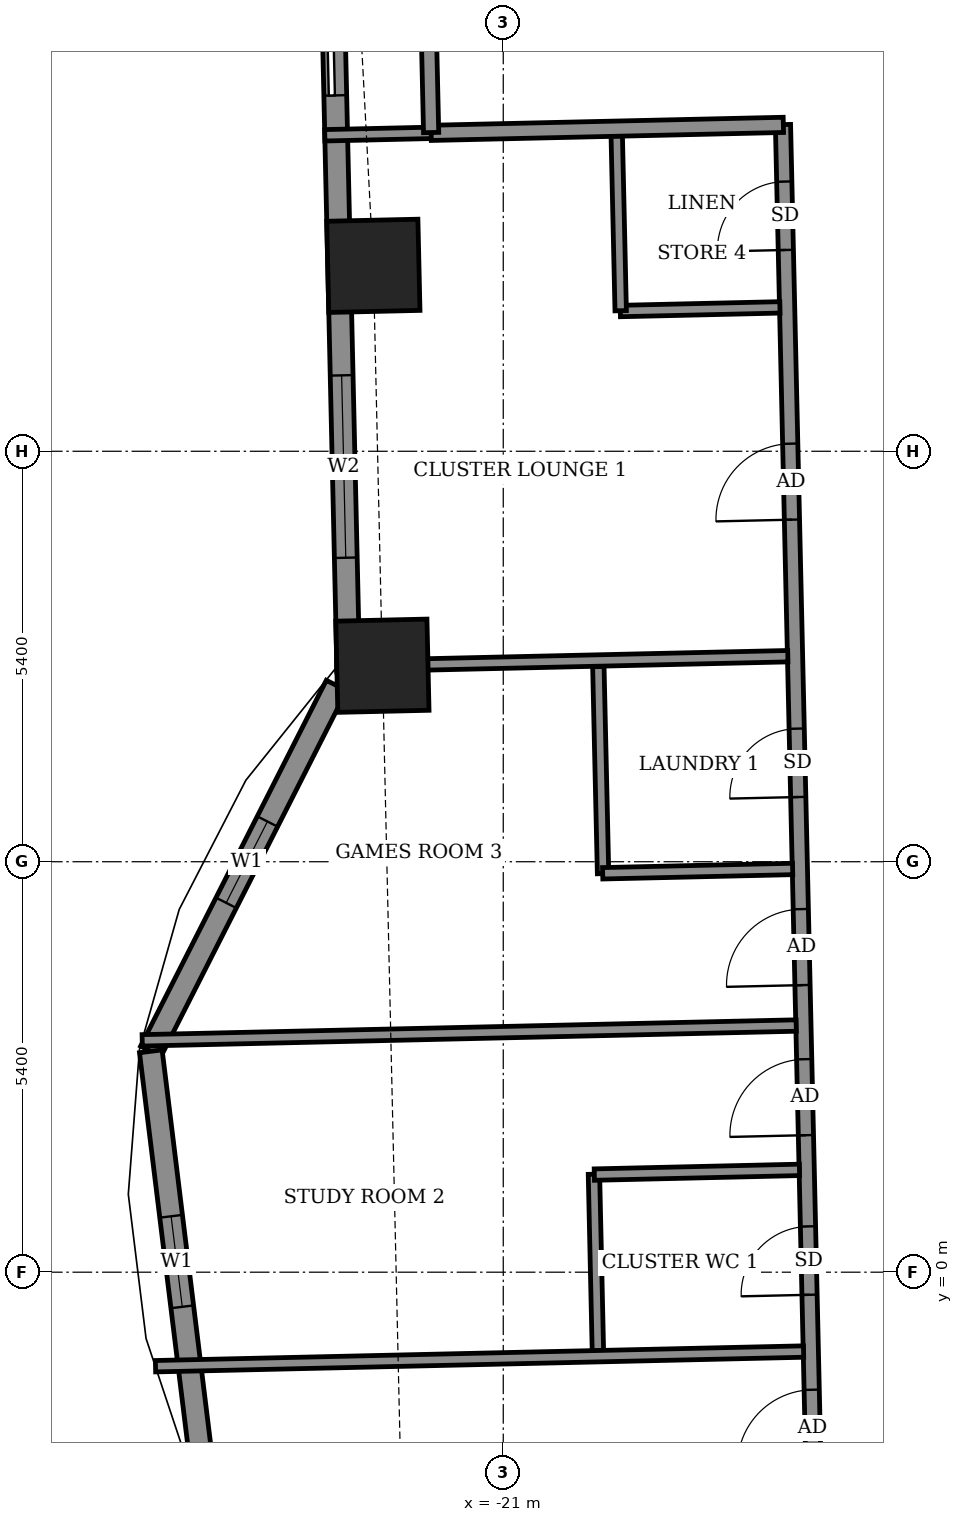
"""IFC4 building model, lengths in metres.
Left out: names, types, materials, properties, quantities, classifications, styles, units other than length and angle.
Written with IfcOpenShell. Run it as: python <this file> out.ifc"""

import sys

from ifc_helpers import new_model, si_unit, direction, frame, frame_2d, origin, origin_2d, place, context, subcontext, project, spatial, rectangle, extrude, element, fill, save


model = new_model("IFC4")
c1 = context("Model", 3, precision=1e-05, world=origin(), true_north=direction((0.0, 1.0)))
c2 = subcontext(c1, "Body", "Model", "MODEL_VIEW")
j1 = project(units=[si_unit("LENGTHUNIT", "METRE"), si_unit("PLANEANGLEUNIT", "RADIAN")], contexts=[c1])
p1 = place(None, origin())
s1 = spatial("IfcSite", under=j1, at=p1, CompositionType="ELEMENT")
p2 = place(p1, origin())
s2 = spatial("IfcBuilding", under=s1, at=p2, CompositionType="ELEMENT")
p3 = place(p2, frame((0.0, 0.0, 189.7)))
s3 = spatial("IfcBuildingStorey", under=s2, at=p3, CompositionType="ELEMENT", Elevation=189.7)
for number, where, z_axis, x_axis in (
    (1, (-22.709, 13.24, -0.55), (0.0, 0.0, 1.0), (0.023, -1.0, 0.0)),
    (2, (-22.59, 7.979, -0.55), (0.0, 0.0, 1.0), (0.023, -1.0, 0.0)),
):
    element("IfcColumn", number, at=place(p3, frame(where, z_axis=z_axis, x_axis=x_axis)), inside=s3, PredefinedType="COLUMN", context=c2, shape_type="SweptSolid", body=[
        extrude(rectangle(XDim=1.2, YDim=1.2, at=origin_2d()), origin(), (0.0, 0.0, 1.0), 3.6),
    ])
p4 = place(p3, frame((-23.275, 18.34, 0.0), z_axis=(0.0, 0.0, 1.0), x_axis=(0.022705985163, -0.999742185885, 0.0)))
e3 = element("IfcWall", 3, at=p4, inside=s3, PredefinedType="SOLIDWALL", context=c2, shape_type="SweptSolid", body=[
    extrude(rectangle(XDim=10.43, YDim=0.3, at=frame_2d((5.215, 0.0))), origin(), (0.0, 0.0, 1.0), 3.05),
])
p5 = place(p4, frame((1.359, 0.0, 0.0)))
e4 = element("IfcOpeningElement", 4, at=p5, cuts=e3, PredefinedType="OPENING", context=c2, shape_type="SweptSolid", body=[
    extrude(rectangle(XDim=1.5, YDim=2.4, at=frame_2d((0.75, 1.2))), frame((0.0, 0.16, 0.0), z_axis=(0.0, -1.0, 0.0), x_axis=(1.0, 0.0, 0.0)), (0.0, 0.0, 1.0), 0.32),
])
p6 = place(p4, frame((6.543, 0.0, 0.9)))
e5 = element("IfcOpeningElement", 5, at=p6, cuts=e3, PredefinedType="OPENING", context=c2, shape_type="SweptSolid", body=[
    extrude(rectangle(XDim=2.4, YDim=1.5, at=frame_2d((1.2, 0.75))), frame((0.0, 0.16, 0.0), z_axis=(0.0, -1.0, 0.0), x_axis=(1.0, 0.0, 0.0)), (0.0, 0.0, 1.0), 0.32),
])
p7 = place(p3, frame((-23.194, 7.719, 0.0), z_axis=(0.0, 0.0, 1.0), x_axis=(-0.452597193435, -0.891715078091, 0.0)))
e6 = element("IfcWall", 6, at=p7, inside=s3, PredefinedType="SOLIDWALL", context=c2, shape_type="SweptSolid", body=[
    extrude(rectangle(XDim=5.397, YDim=0.3, at=frame_2d((2.699, 0.0))), origin(), (0.0, 0.0, 1.0), 3.05),
])
p8 = place(p7, frame((2.007, 0.0, 0.9)))
e7 = element("IfcOpeningElement", 7, at=p8, cuts=e6, PredefinedType="OPENING", context=c2, shape_type="SweptSolid", body=[
    extrude(rectangle(XDim=1.2, YDim=1.5, at=frame_2d((0.6, 0.75))), frame((0.0, 0.16, 0.0), z_axis=(0.0, -1.0, 0.0), x_axis=(1.0, 0.0, 0.0)), (0.0, 0.0, 1.0), 0.32),
])
p9 = place(p3, frame((-25.637, 2.906, 0.0), z_axis=(0.0, 0.0, 1.0), x_axis=(0.122163831021, -0.992509948761, 0.0)))
e8 = element("IfcWall", 8, at=p9, inside=s3, PredefinedType="SOLIDWALL", context=c2, shape_type="SweptSolid", body=[
    extrude(rectangle(XDim=5.574, YDim=0.3, at=frame_2d((2.787, 0.0))), origin(), (0.0, 0.0, 1.0), 3.05),
])
p10 = place(p9, frame((2.187, 0.0, 0.9)))
e9 = element("IfcOpeningElement", 9, at=p10, cuts=e8, PredefinedType="OPENING", context=c2, shape_type="SweptSolid", body=[
    extrude(rectangle(XDim=1.2, YDim=1.5, at=frame_2d((0.6, 0.75))), frame((0.0, 0.16, 0.0), z_axis=(0.0, -1.0, 0.0), x_axis=(1.0, 0.0, 0.0)), (0.0, 0.0, 1.0), 0.32),
])
p11 = place(p3, frame((-25.988, 16.028, 0.0), z_axis=(0.0, 0.0, 1.0), x_axis=(-0.022892431828, 0.999737933943, 0.0)))
e10 = element("IfcWall", 10, at=p11, inside=s3, PredefinedType="USERDEFINED", context=c2, shape_type="SweptSolid", body=[
    extrude(rectangle(XDim=2.4, YDim=0.55, at=frame_2d((1.2, 0.0))), origin(), (0.0, 0.0, 1.0), 0.8),
])
p12 = place(p3, frame((-16.684, -12.919, 0.0), z_axis=(0.0, 0.0, 1.0), x_axis=(-0.022694293906, 0.999742451346, 0.0)))
e11 = element("IfcWall", 11, at=p12, inside=s3, PredefinedType="PARTITIONING", context=c2, shape_type="SweptSolid", body=[
    extrude(rectangle(XDim=28.024, YDim=0.2, at=frame_2d((14.012, 0.0))), origin(), (0.0, 0.0, 1.0), 3.05),
])
p13 = place(p12, frame((22.825, 0.0, 0.0)))
e12 = element("IfcOpeningElement", 12, at=p13, cuts=e11, PredefinedType="OPENING", context=c2, shape_type="SweptSolid", body=[
    extrude(rectangle(XDim=1.0, YDim=2.1, at=frame_2d((0.5, 1.05))), frame((0.0, 0.11, 0.0), z_axis=(0.0, -1.0, 0.0), x_axis=(1.0, 0.0, 0.0)), (0.0, 0.0, 1.0), 0.22),
])
p14 = place(p12, frame((26.374, 0.0, 0.0)))
e13 = element("IfcOpeningElement", 13, at=p14, cuts=e11, PredefinedType="OPENING", context=c2, shape_type="SweptSolid", body=[
    extrude(rectangle(XDim=0.9, YDim=2.1, at=frame_2d((0.45, 1.05))), frame((0.0, 0.11, 0.0), z_axis=(0.0, -1.0, 0.0), x_axis=(1.0, 0.0, 0.0)), (0.0, 0.0, 1.0), 0.22),
])
p15 = place(p12, frame((16.7, 0.0, 0.0)))
e14 = element("IfcOpeningElement", 14, at=p15, cuts=e11, PredefinedType="OPENING", context=c2, shape_type="SweptSolid", body=[
    extrude(rectangle(XDim=1.0, YDim=2.1, at=frame_2d((0.5, 1.05))), frame((0.0, 0.11, 0.0), z_axis=(0.0, -1.0, 0.0), x_axis=(1.0, 0.0, 0.0)), (0.0, 0.0, 1.0), 0.22),
])
p16 = place(p12, frame((19.175, 0.0, 0.0)))
e15 = element("IfcOpeningElement", 15, at=p16, cuts=e11, PredefinedType="OPENING", context=c2, shape_type="SweptSolid", body=[
    extrude(rectangle(XDim=0.9, YDim=2.1, at=frame_2d((0.45, 1.05))), frame((0.0, 0.11, 0.0), z_axis=(0.0, -1.0, 0.0), x_axis=(1.0, 0.0, 0.0)), (0.0, 0.0, 1.0), 0.22),
])
p17 = place(p12, frame((14.725, 0.0, 0.0)))
e16 = element("IfcOpeningElement", 16, at=p17, cuts=e11, PredefinedType="OPENING", context=c2, shape_type="SweptSolid", body=[
    extrude(rectangle(XDim=1.0, YDim=2.1, at=frame_2d((0.5, 1.05))), frame((0.0, 0.11, 0.0), z_axis=(0.0, -1.0, 0.0), x_axis=(1.0, 0.0, 0.0)), (0.0, 0.0, 1.0), 0.22),
])
p18 = place(p12, frame((12.625, 0.0, 0.0)))
e17 = element("IfcOpeningElement", 17, at=p18, cuts=e11, PredefinedType="OPENING", context=c2, shape_type="SweptSolid", body=[
    extrude(rectangle(XDim=0.9, YDim=2.1, at=frame_2d((0.45, 1.05))), frame((0.0, 0.11, 0.0), z_axis=(0.0, -1.0, 0.0), x_axis=(1.0, 0.0, 0.0)), (0.0, 0.0, 1.0), 0.22),
])
p19 = place(p12, frame((10.375, 0.0, 0.0)))
e18 = element("IfcOpeningElement", 18, at=p19, cuts=e11, PredefinedType="OPENING", context=c2, shape_type="SweptSolid", body=[
    extrude(rectangle(XDim=1.0, YDim=2.1, at=frame_2d((0.5, 1.05))), frame((0.0, 0.11, 0.0), z_axis=(0.0, -1.0, 0.0), x_axis=(1.0, 0.0, 0.0)), (0.0, 0.0, 1.0), 0.22),
])
p20 = place(p12, frame((8.125, 0.0, 0.0)))
e19 = element("IfcOpeningElement", 19, at=p20, cuts=e11, PredefinedType="OPENING", context=c2, shape_type="SweptSolid", body=[
    extrude(rectangle(XDim=0.9, YDim=2.1, at=frame_2d((0.45, 1.05))), frame((0.0, 0.11, 0.0), z_axis=(0.0, -1.0, 0.0), x_axis=(1.0, 0.0, 0.0)), (0.0, 0.0, 1.0), 0.22),
])
p21 = place(p12, frame((3.462, 0.0, 0.0)))
e20 = element("IfcOpeningElement", 20, at=p21, cuts=e11, PredefinedType="OPENING", context=c2, shape_type="SweptSolid", body=[
    extrude(rectangle(XDim=1.0, YDim=2.1, at=frame_2d((0.5, 1.05))), frame((0.0, 0.11, 0.0), z_axis=(0.0, -1.0, 0.0), x_axis=(1.0, 0.0, 0.0)), (0.0, 0.0, 1.0), 0.22),
])
p22 = place(p12, frame((5.625, 0.0, 0.0)))
e21 = element("IfcOpeningElement", 21, at=p22, cuts=e11, PredefinedType="OPENING", context=c2, shape_type="SweptSolid", body=[
    extrude(rectangle(XDim=0.9, YDim=2.1, at=frame_2d((0.45, 1.05))), frame((0.0, 0.11, 0.0), z_axis=(0.0, -1.0, 0.0), x_axis=(1.0, 0.0, 0.0)), (0.0, 0.0, 1.0), 0.22),
])
p23 = place(p3, frame((-19.755, -1.035, 0.0), z_axis=(0.0, 0.0, 1.0), x_axis=(-0.022370700241, 0.999749744571, 0.0)))
e22 = element("IfcWall", 22, at=p23, inside=s3, PredefinedType="PARTITIONING", context=c2, shape_type="SweptSolid", body=[
    extrude(rectangle(XDim=2.324, YDim=0.15, at=frame_2d((1.162, 0.0))), origin(), (0.0, 0.0, 1.0), 3.05),
])
p24 = place(p3, frame((-25.575, -1.237, 0.0), z_axis=(0.0, 0.0, 1.0), x_axis=(0.999743576582, 0.022644670096, 0.0)))
e23 = element("IfcWall", 23, at=p24, inside=s3, PredefinedType="PARTITIONING", context=c2, shape_type="SweptSolid", body=[
    extrude(rectangle(XDim=8.528, YDim=0.15, at=frame_2d((4.264, 0.0))), origin(), (0.0, 0.0, 1.0), 2.05),
])
p25 = place(p3, frame((-19.802, 1.284, 0.0), z_axis=(0.0, 0.0, 1.0), x_axis=(0.999736155505, 0.022969966847, 0.0)))
e24 = element("IfcWall", 24, at=p25, inside=s3, PredefinedType="PARTITIONING", context=c2, shape_type="SweptSolid", body=[
    extrude(rectangle(XDim=2.7, YDim=0.15, at=frame_2d((1.35, 0.0))), origin(), (0.0, 0.0, 1.0), 3.05),
])
p26 = place(p3, frame((-25.75, 3.05, 0.0), z_axis=(0.0, 0.0, 1.0), x_axis=(0.999743093505, 0.022665987507, 0.0)))
e25 = element("IfcWall", 25, at=p26, inside=s3, PredefinedType="PARTITIONING", context=c2, shape_type="SweptSolid", body=[
    extrude(rectangle(XDim=8.606, YDim=0.15, at=frame_2d((4.303, 0.0))), origin(), (0.0, 0.0, 1.0), 2.05),
])
p27 = place(p3, frame((-19.687, 5.243, 0.0), z_axis=(0.0, 0.0, 1.0), x_axis=(-0.022758040381, 0.999741002259, 0.0)))
e26 = element("IfcWall", 26, at=p27, inside=s3, PredefinedType="PARTITIONING", context=c2, shape_type="SweptSolid", body=[
    extrude(rectangle(XDim=2.725, YDim=0.15, at=frame_2d((1.362, 0.0))), origin(), (0.0, 0.0, 1.0), 3.05),
])
p28 = place(p3, frame((-19.692, 5.248, 0.0), z_axis=(0.0, 0.0, 1.0), x_axis=(0.999740977561, 0.022759125332, 0.0)))
e27 = element("IfcWall", 27, at=p28, inside=s3, PredefinedType="PARTITIONING", context=c2, shape_type="SweptSolid", body=[
    extrude(rectangle(XDim=2.5, YDim=0.15, at=frame_2d((1.25, 0.0))), origin(), (0.0, 0.0, 1.0), 3.05),
])
p29 = place(p3, frame((-23.19, 7.969, 0.0), z_axis=(0.0, 0.0, 1.0), x_axis=(0.999741261868, 0.022746633113, 0.0)))
e28 = element("IfcWall", 28, at=p29, inside=s3, PredefinedType="PARTITIONING", context=c2, shape_type="SweptSolid", body=[
    extrude(rectangle(XDim=5.935, YDim=0.15, at=frame_2d((2.968, 0.0))), origin(), (0.0, 0.0, 1.0), 3.05),
])
p30 = place(p3, frame((-19.46, 12.645, 0.0), z_axis=(0.0, 0.0, 1.0), x_axis=(0.999737799372, 0.022898307927, 0.0)))
e29 = element("IfcWall", 29, at=p30, inside=s3, PredefinedType="PARTITIONING", context=c2, shape_type="SweptSolid", body=[
    extrude(rectangle(XDim=2.1, YDim=0.15, at=frame_2d((1.05, 0.0))), origin(), (0.0, 0.0, 1.0), 3.05),
])
p31 = place(p3, frame((-19.455, 12.649, 0.0), z_axis=(0.0, 0.0, 1.0), x_axis=(-0.022603288534, 0.999744513037, 0.0)))
e30 = element("IfcWall", 30, at=p31, inside=s3, PredefinedType="PARTITIONING", context=c2, shape_type="SweptSolid", body=[
    extrude(rectangle(XDim=2.301, YDim=0.15, at=frame_2d((1.15, 0.0))), origin(), (0.0, 0.0, 1.0), 3.05),
])
p32 = place(p3, frame((-23.348, 14.957, 0.0), z_axis=(0.0, 0.0, 1.0), x_axis=(0.999740216184, 0.022792545827, 0.0)))
e31 = element("IfcWall", 31, at=p32, inside=s3, PredefinedType="PARTITIONING", context=c2, shape_type="SweptSolid", body=[
    extrude(rectangle(XDim=1.403, YDim=0.15, at=frame_2d((0.702, 0.0))), origin(), (0.0, 0.0, 1.0), 2.55),
])
p33 = place(p3, frame((-21.949, 14.989, 0.0), z_axis=(0.0, 0.0, 1.0), x_axis=(0.999743491588, 0.022648422179, 0.0)))
e32 = element("IfcWall", 32, at=p33, inside=s3, PredefinedType="PARTITIONING", context=c2, shape_type="SweptSolid", body=[
    extrude(rectangle(XDim=4.635, YDim=0.2, at=frame_2d((2.318, 0.0))), origin(), (0.0, 0.0, 1.0), 3.05),
])
p34 = place(p3, frame((-21.949, 14.993, 0.0), z_axis=(0.0, 0.0, 1.0), x_axis=(-0.022617910375, 0.999744182344, 0.0)))
e33 = element("IfcWall", 33, at=p34, inside=s3, PredefinedType="PARTITIONING", context=c2, shape_type="SweptSolid", body=[
    extrude(rectangle(XDim=1.5, YDim=0.2, at=frame_2d((0.75, 0.0))), origin(), (0.0, 0.0, 1.0), 3.05),
])
p35 = place(p5, origin())
e34 = element("IfcDoor", 34, at=p35, inside=s3, OperationType="SLIDING_TO_LEFT", PredefinedType="DOOR", context=c2, shape_type="SweptSolid", body=[
    extrude(rectangle(XDim=1.5, YDim=2.4, at=frame_2d((0.75, 1.2))), frame((0.0, 0.025, 0.0), z_axis=(0.0, -1.0, 0.0), x_axis=(1.0, 0.0, 0.0)), (0.0, 0.0, 1.0), 0.05),
])
fill(e4, e34)
p36 = place(p6, origin())
e35 = element("IfcWindow", 35, at=p36, inside=s3, PartitioningType="DOUBLE_PANEL_VERTICAL", PredefinedType="WINDOW", context=c2, shape_type="SweptSolid", body=[
    extrude(rectangle(XDim=2.4, YDim=1.5, at=frame_2d((1.2, 0.75))), frame((0.0, 0.03, 0.0), z_axis=(0.0, -1.0, 0.0), x_axis=(1.0, 0.0, 0.0)), (0.0, 0.0, 1.0), 0.06),
])
fill(e5, e35)
p37 = place(p8, origin())
e36 = element("IfcWindow", 36, at=p37, inside=s3, PartitioningType="SINGLE_PANEL", PredefinedType="WINDOW", context=c2, shape_type="SweptSolid", body=[
    extrude(rectangle(XDim=1.2, YDim=1.5, at=frame_2d((0.6, 0.75))), frame((0.0, 0.03, 0.0), z_axis=(0.0, -1.0, 0.0), x_axis=(1.0, 0.0, 0.0)), (0.0, 0.0, 1.0), 0.06),
])
fill(e7, e36)
p38 = place(p10, origin())
e37 = element("IfcWindow", 37, at=p38, inside=s3, PartitioningType="SINGLE_PANEL", PredefinedType="WINDOW", context=c2, shape_type="SweptSolid", body=[
    extrude(rectangle(XDim=1.2, YDim=1.5, at=frame_2d((0.6, 0.75))), frame((0.0, 0.03, 0.0), z_axis=(0.0, -1.0, 0.0), x_axis=(1.0, 0.0, 0.0)), (0.0, 0.0, 1.0), 0.06),
])
fill(e9, e37)
p39 = place(p13, origin())
e38 = element("IfcDoor", 38, at=p39, inside=s3, OperationType="SINGLE_SWING_RIGHT", PredefinedType="DOOR", context=c2, shape_type="SweptSolid", body=[
    extrude(rectangle(XDim=1.0, YDim=2.1, at=frame_2d((0.5, 1.05))), frame((0.0, 0.025, 0.0), z_axis=(0.0, -1.0, 0.0), x_axis=(1.0, 0.0, 0.0)), (0.0, 0.0, 1.0), 0.05),
])
fill(e12, e38)
p40 = place(p14, origin())
e39 = element("IfcDoor", 39, at=p40, inside=s3, OperationType="SINGLE_SWING_RIGHT", PredefinedType="DOOR", context=c2, shape_type="SweptSolid", body=[
    extrude(rectangle(XDim=0.9, YDim=2.1, at=frame_2d((0.45, 1.05))), frame((0.0, 0.025, 0.0), z_axis=(0.0, -1.0, 0.0), x_axis=(1.0, 0.0, 0.0)), (0.0, 0.0, 1.0), 0.05),
])
fill(e13, e39)
p41 = place(p15, origin())
e40 = element("IfcDoor", 40, at=p41, inside=s3, OperationType="SINGLE_SWING_LEFT", PredefinedType="DOOR", context=c2, shape_type="SweptSolid", body=[
    extrude(rectangle(XDim=1.0, YDim=2.1, at=frame_2d((0.5, 1.05))), frame((0.0, 0.025, 0.0), z_axis=(0.0, -1.0, 0.0), x_axis=(1.0, 0.0, 0.0)), (0.0, 0.0, 1.0), 0.05),
])
fill(e14, e40)
p42 = place(p16, origin())
e41 = element("IfcDoor", 41, at=p42, inside=s3, OperationType="SINGLE_SWING_LEFT", PredefinedType="DOOR", context=c2, shape_type="SweptSolid", body=[
    extrude(rectangle(XDim=0.9, YDim=2.1, at=frame_2d((0.45, 1.05))), frame((0.0, 0.025, 0.0), z_axis=(0.0, -1.0, 0.0), x_axis=(1.0, 0.0, 0.0)), (0.0, 0.0, 1.0), 0.05),
])
fill(e15, e41)
p43 = place(p17, origin())
e42 = element("IfcDoor", 42, at=p43, inside=s3, OperationType="SINGLE_SWING_RIGHT", PredefinedType="DOOR", context=c2, shape_type="SweptSolid", body=[
    extrude(rectangle(XDim=1.0, YDim=2.1, at=frame_2d((0.5, 1.05))), frame((0.0, 0.025, 0.0), z_axis=(0.0, -1.0, 0.0), x_axis=(1.0, 0.0, 0.0)), (0.0, 0.0, 1.0), 0.05),
])
fill(e16, e42)
p44 = place(p18, origin())
e43 = element("IfcDoor", 43, at=p44, inside=s3, OperationType="SINGLE_SWING_RIGHT", PredefinedType="DOOR", context=c2, shape_type="SweptSolid", body=[
    extrude(rectangle(XDim=0.9, YDim=2.1, at=frame_2d((0.45, 1.05))), frame((0.0, 0.025, 0.0), z_axis=(0.0, -1.0, 0.0), x_axis=(1.0, 0.0, 0.0)), (0.0, 0.0, 1.0), 0.05),
])
fill(e17, e43)
p45 = place(p19, origin())
e44 = element("IfcDoor", 44, at=p45, inside=s3, OperationType="SINGLE_SWING_LEFT", PredefinedType="DOOR", context=c2, shape_type="SweptSolid", body=[
    extrude(rectangle(XDim=1.0, YDim=2.1, at=frame_2d((0.5, 1.05))), frame((0.0, 0.025, 0.0), z_axis=(0.0, -1.0, 0.0), x_axis=(1.0, 0.0, 0.0)), (0.0, 0.0, 1.0), 0.05),
])
fill(e18, e44)
save(model, sys.argv[1])
